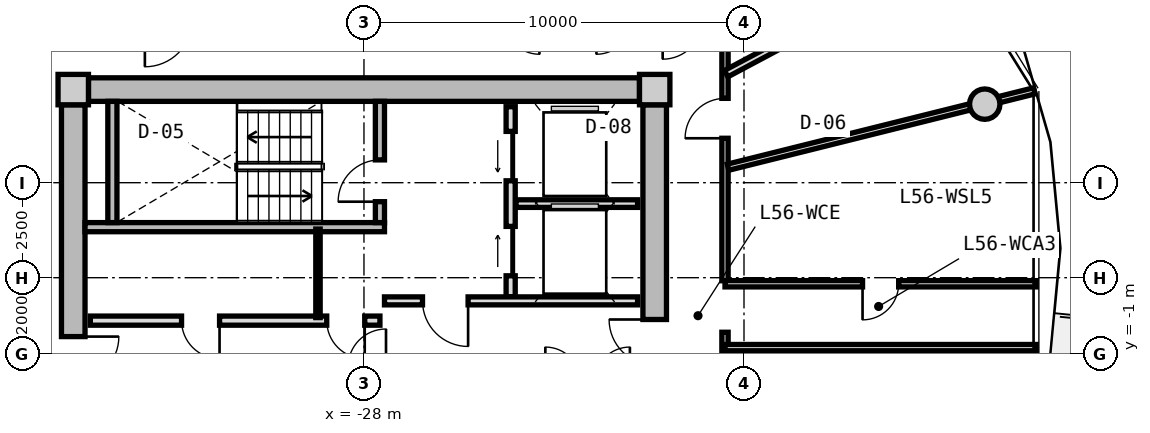
"""IFC4 building model, lengths in metres.
Left out: names, types, materials, properties, quantities, classifications, styles, units other than length and angle.
Written with IfcOpenShell. Run it as: python <this file> out.ifc"""

import sys

from ifc_helpers import new_model, si_unit, direction, frame, frame_2d, origin, origin_2d, place, context, subcontext, project, spatial, rectangle, circle, extrude, source, transform, mapped, element, fill, save


model = new_model("IFC4")
c1 = context("Model", 3, precision=1e-05, world=origin(), true_north=direction((0.0, 1.0)))
c2 = subcontext(c1, "Body", "Model", "MODEL_VIEW")
j1 = project(units=[si_unit("LENGTHUNIT", "METRE"), si_unit("PLANEANGLEUNIT", "RADIAN")], contexts=[c1])
p1 = place(None, origin())
s1 = spatial("IfcSite", under=j1, at=p1, CompositionType="ELEMENT")
p2 = place(p1, origin())
s2 = spatial("IfcBuilding", under=s1, at=p2, CompositionType="ELEMENT")
p3 = place(p2, frame((0.0, 0.0, 180.05)))
s3 = spatial("IfcBuildingStorey", under=s2, at=p3, CompositionType="ELEMENT", Elevation=180.05)
m1 = source(origin(), c2, "Body", "SweptSolid", [
    extrude(rectangle(XDim=0.8, YDim=0.8, at=origin_2d()), origin(), (0.0, 0.0, 1.0), 3.05),
])
for number, where, z_axis, x_axis in (
    (1, (-20.35, 5.95, 0.0), (0.0, 0.0, 1.0), (1.0, 0.0, 0.0)),
    (2, (-35.65, 5.95, 0.0), (0.0, 0.0, 1.0), (1.0, 0.0, 0.0)),
):
    element("IfcColumn", number, at=place(p3, frame(where, z_axis=z_axis, x_axis=x_axis)), inside=s3, PredefinedType="COLUMN", context=c2, shape_type="MappedRepresentation", body=[
        mapped(m1, transform((0.0, 0.0, 0.0), x_axis=(1.0, 0.0, 0.0), y_axis=(0.0, 1.0, 0.0), z_axis=(0.0, 0.0, 1.0), scale=1.0)),
    ])
m2 = source(origin(), c2, "Body", "SweptSolid", [
    extrude(rectangle(XDim=14.5, YDim=0.62, at=frame_2d((7.25, 0.0))), origin(), (0.0, 0.0, 1.0), 2.81),
])
p4 = place(p3, frame((-35.25, 5.95, 0.0), z_axis=(0.0, 0.0, 1.0), x_axis=(1.0, 0.0, 0.0)))
e3 = element("IfcWall", 3, at=p4, inside=s3, PredefinedType="SHEAR", context=c2, shape_type="MappedRepresentation", body=[
    mapped(m2, transform((0.0, 0.0, 0.0), x_axis=(1.0, 0.0, 0.0), y_axis=(0.0, 1.0, 0.0), z_axis=(0.0, 0.0, 1.0), scale=1.0)),
])
m3 = source(origin(), c2, "Body", "SweptSolid", [
    extrude(rectangle(XDim=11.1, YDim=0.62, at=frame_2d((5.55, 0.0))), origin(), (0.0, 0.0, 1.0), 2.81),
])
p5 = place(p3, frame((-35.65, -5.55, 0.0), z_axis=(0.0, 0.0, 1.0), x_axis=(0.0, 1.0, 0.0)))
e4 = element("IfcWall", 4, at=p5, inside=s3, PredefinedType="SHEAR", context=c2, shape_type="MappedRepresentation", body=[
    mapped(m3, transform((0.0, 0.0, 0.0), x_axis=(1.0, 0.0, 0.0), y_axis=(0.0, 1.0, 0.0), z_axis=(0.0, 0.0, 1.0), scale=1.0)),
])
p6 = place(p5, frame((3.8, 0.0, 0.0)))
e5 = element("IfcOpeningElement", 5, at=p6, cuts=e4, PredefinedType="OPENING", context=c2, shape_type="SweptSolid", body=[
    extrude(rectangle(XDim=1.2, YDim=2.15, at=frame_2d((0.6, 1.075))), frame((0.0, 0.32, 0.0), z_axis=(0.0, -1.0, 0.0), x_axis=(1.0, 0.0, 0.0)), (0.0, 0.0, 1.0), 0.64),
])
p7 = place(p3, frame((-20.35, 5.55, 0.0), z_axis=(0.0, 0.0, 1.0), x_axis=(0.0, -1.0, 0.0)))
e6 = element("IfcWall", 6, at=p7, inside=s3, PredefinedType="SHEAR", context=c2, shape_type="MappedRepresentation", body=[
    mapped(m3, transform((0.0, 0.0, 0.0), x_axis=(1.0, 0.0, 0.0), y_axis=(0.0, 1.0, 0.0), z_axis=(0.0, 0.0, 1.0), scale=1.0)),
])
p8 = place(p7, frame((5.65, 0.0, 0.0)))
e7 = element("IfcOpeningElement", 7, at=p8, cuts=e6, PredefinedType="OPENING", context=c2, shape_type="SweptSolid", body=[
    extrude(rectangle(XDim=1.2, YDim=2.15, at=frame_2d((0.6, 1.075))), frame((0.0, 0.32, 0.0), z_axis=(0.0, -1.0, 0.0), x_axis=(1.0, 0.0, 0.0)), (0.0, 0.0, 1.0), 0.64),
])
m4 = source(origin(), c2, "Body", "SweptSolid", [
    extrude(circle(Radius=0.4, at=origin_2d()), origin(), (0.0, 0.0, 1.0), 3.05),
])
p9 = place(p3, frame((-11.665, 5.567, 0.0), z_axis=(0.0, 0.0, 1.0), x_axis=(1.0, 0.0, 0.0)))
e8 = element("IfcColumn", 8, at=p9, inside=s3, PredefinedType="COLUMN", context=c2, shape_type="MappedRepresentation", body=[
    mapped(m4, transform((0.0, 0.0, 0.0), x_axis=(1.0, 0.0, 0.0), y_axis=(0.0, 1.0, 0.0), z_axis=(0.0, 0.0, 1.0), scale=1.0)),
])
m5 = source(origin(), c2, "Body", "SweptSolid", [
    extrude(rectangle(XDim=7.88, YDim=0.24, at=frame_2d((3.94, 0.0))), origin(), (0.0, 0.0, 1.0), 2.81),
])
p10 = place(p3, frame((-35.34, 2.33, 0.0), z_axis=(0.0, 0.0, 1.0), x_axis=(1.0, 0.0, 0.0)))
e9 = element("IfcWall", 9, at=p10, inside=s3, PredefinedType="PARTITIONING", context=c2, shape_type="MappedRepresentation", body=[
    mapped(m5, transform((0.0, 0.0, 0.0), x_axis=(1.0, 0.0, 0.0), y_axis=(0.0, 1.0, 0.0), z_axis=(0.0, 0.0, 1.0), scale=1.0)),
])
m6 = source(origin(), c2, "Body", "SweptSolid", [
    extrude(rectangle(XDim=3.19, YDim=0.24, at=frame_2d((1.595, 0.0))), origin(), (0.0, 0.0, 1.0), 2.81),
])
p11 = place(p3, frame((-34.62, 2.45, 0.0), z_axis=(0.0, 0.0, 1.0), x_axis=(0.0, 1.0, 0.0)))
e10 = element("IfcWall", 10, at=p11, inside=s3, PredefinedType="PARTITIONING", context=c2, shape_type="MappedRepresentation", body=[
    mapped(m6, transform((0.0, 0.0, 0.0), x_axis=(1.0, 0.0, 0.0), y_axis=(0.0, 1.0, 0.0), z_axis=(0.0, 0.0, 1.0), scale=1.0)),
])
p12 = place(p3, frame((-27.58, 2.45, 0.0), z_axis=(0.0, 0.0, 1.0), x_axis=(0.0, 1.0, 0.0)))
e11 = element("IfcWall", 11, at=p12, inside=s3, PredefinedType="PARTITIONING", context=c2, shape_type="MappedRepresentation", body=[
    mapped(m6, transform((0.0, 0.0, 0.0), x_axis=(1.0, 0.0, 0.0), y_axis=(0.0, 1.0, 0.0), z_axis=(0.0, 0.0, 1.0), scale=1.0)),
])
p13 = place(p12, frame((0.55, 0.0, 0.0)))
e12 = element("IfcOpeningElement", 12, at=p13, cuts=e11, PredefinedType="OPENING", context=c2, shape_type="SweptSolid", body=[
    extrude(rectangle(XDim=1.1, YDim=2.15, at=frame_2d((0.55, 1.075))), frame((0.0, 0.13, 0.0), z_axis=(0.0, -1.0, 0.0), x_axis=(1.0, 0.0, 0.0)), (0.0, 0.0, 1.0), 0.26),
])
m7 = source(origin(), c2, "Body", "SweptSolid", [
    extrude(rectangle(XDim=5.0, YDim=0.24, at=frame_2d((2.5, 0.0))), origin(), (0.0, 0.0, 1.0), 2.795),
])
p14 = place(p3, frame((-24.14, 0.5, 0.0), z_axis=(0.0, 0.0, 1.0), x_axis=(0.0, 1.0, 0.0)))
e13 = element("IfcWall", 13, at=p14, inside=s3, PredefinedType="PARTITIONING", context=c2, shape_type="MappedRepresentation", body=[
    mapped(m7, transform((0.0, 0.0, 0.0), x_axis=(1.0, 0.0, 0.0), y_axis=(0.0, 1.0, 0.0), z_axis=(0.0, 0.0, 1.0), scale=1.0)),
])
p15 = place(p14, frame((3.05, 0.0, 0.0)))
e14 = element("IfcOpeningElement", 14, at=p15, cuts=e13, PredefinedType="OPENING", context=c2, shape_type="SweptSolid", body=[
    extrude(rectangle(XDim=1.3, YDim=2.2, at=frame_2d((0.65, 1.1))), frame((0.0, 0.13, 0.0), z_axis=(0.0, -1.0, 0.0), x_axis=(1.0, 0.0, 0.0)), (0.0, 0.0, 1.0), 0.26),
])
p16 = place(p14, frame((0.55, 0.0, 0.0)))
e15 = element("IfcOpeningElement", 15, at=p16, cuts=e13, PredefinedType="OPENING", context=c2, shape_type="SweptSolid", body=[
    extrude(rectangle(XDim=1.3, YDim=2.2, at=frame_2d((0.65, 1.1))), frame((0.0, 0.13, 0.0), z_axis=(0.0, -1.0, 0.0), x_axis=(1.0, 0.0, 0.0)), (0.0, 0.0, 1.0), 0.26),
])
m8 = source(origin(), c2, "Body", "SweptSolid", [
    extrude(rectangle(XDim=3.2, YDim=0.2, at=frame_2d((1.6, 0.0))), origin(), (0.0, 0.0, 1.0), 2.795),
])
p17 = place(p3, frame((-24.0, 2.95, 0.0), z_axis=(0.0, 0.0, 1.0), x_axis=(1.0, 0.0, 0.0)))
e16 = element("IfcWall", 16, at=p17, inside=s3, PredefinedType="PARTITIONING", context=c2, shape_type="MappedRepresentation", body=[
    mapped(m8, transform((0.0, 0.0, 0.0), x_axis=(1.0, 0.0, 0.0), y_axis=(0.0, 1.0, 0.0), z_axis=(0.0, 0.0, 1.0), scale=1.0)),
])
m9 = source(origin(), c2, "Body", "SweptSolid", [
    extrude(rectangle(XDim=6.66, YDim=0.21, at=frame_2d((3.33, 0.0))), origin(), (0.0, 0.0, 1.0), 2.795),
])
p18 = place(p3, frame((-27.46, 0.39, 0.0), z_axis=(0.0, 0.0, 1.0), x_axis=(1.0, 0.0, 0.0)))
e17 = element("IfcWall", 17, at=p18, inside=s3, PredefinedType="PARTITIONING", context=c2, shape_type="MappedRepresentation", body=[
    mapped(m9, transform((0.0, 0.0, 0.0), x_axis=(1.0, 0.0, 0.0), y_axis=(0.0, 1.0, 0.0), z_axis=(0.0, 0.0, 1.0), scale=1.0)),
])
p19 = place(p18, frame((1.0, 0.0, 0.0)))
e18 = element("IfcOpeningElement", 18, at=p19, cuts=e17, PredefinedType="OPENING", context=c2, shape_type="SweptSolid", body=[
    extrude(rectangle(XDim=1.2, YDim=2.15, at=frame_2d((0.6, 1.075))), frame((0.0, 0.115, 0.0), z_axis=(0.0, -1.0, 0.0), x_axis=(1.0, 0.0, 0.0)), (0.0, 0.0, 1.0), 0.23),
])
m10 = source(origin(), c2, "Body", "SweptSolid", [
    extrude(rectangle(XDim=7.62, YDim=0.24, at=frame_2d((3.81, 0.0))), origin(), (0.0, 0.0, 1.0), 2.795),
])
p20 = place(p3, frame((-35.2, -0.13, 0.0), z_axis=(0.0, 0.0, 1.0), x_axis=(1.0, 0.0, 0.0)))
e19 = element("IfcWall", 19, at=p20, inside=s3, PredefinedType="PARTITIONING", context=c2, shape_type="MappedRepresentation", body=[
    mapped(m10, transform((0.0, 0.0, 0.0), x_axis=(1.0, 0.0, 0.0), y_axis=(0.0, 1.0, 0.0), z_axis=(0.0, 0.0, 1.0), scale=1.0)),
])
p21 = place(p20, frame((6.22, 0.0, 0.0)))
e20 = element("IfcOpeningElement", 20, at=p21, cuts=e19, PredefinedType="OPENING", context=c2, shape_type="SweptSolid", body=[
    extrude(rectangle(XDim=1.0, YDim=2.1, at=frame_2d((0.5, 1.05))), frame((0.0, 0.13, 0.0), z_axis=(0.0, -1.0, 0.0), x_axis=(1.0, 0.0, 0.0)), (0.0, 0.0, 1.0), 0.26),
])
p22 = place(p20, frame((2.4, 0.0, 0.0)))
e21 = element("IfcOpeningElement", 21, at=p22, cuts=e19, PredefinedType="OPENING", context=c2, shape_type="SweptSolid", body=[
    extrude(rectangle(XDim=1.0, YDim=2.1, at=frame_2d((0.5, 1.05))), frame((0.0, 0.13, 0.0), z_axis=(0.0, -1.0, 0.0), x_axis=(1.0, 0.0, 0.0)), (0.0, 0.0, 1.0), 0.26),
])
m11 = source(origin(), c2, "Body", "SweptSolid", [
    extrude(rectangle(XDim=2.33, YDim=0.115, at=frame_2d((1.165, 0.0))), origin(), (0.0, 0.0, 1.0), 2.795),
])
p23 = place(p3, frame((-29.21, -0.05, 0.0), z_axis=(0.0, 0.0, 1.0), x_axis=(0.0, 1.0, 0.0)))
e22 = element("IfcWall", 22, at=p23, inside=s3, PredefinedType="PARTITIONING", context=c2, shape_type="MappedRepresentation", body=[
    mapped(m11, transform((0.0, 0.0, 0.0), x_axis=(1.0, 0.0, 0.0), y_axis=(0.0, 1.0, 0.0), z_axis=(0.0, 0.0, 1.0), scale=1.0)),
])
m12 = source(origin(), c2, "Body", "SweptSolid", [
    extrude(rectangle(XDim=6.88, YDim=0.165, at=frame_2d((3.44, 0.0))), origin(), (0.0, 0.0, 1.0), 2.795),
])
p24 = place(p3, frame((-18.5, 7.8, 0.0), z_axis=(0.0, 0.0, 1.0), x_axis=(0.0, -1.0, 0.0)))
e23 = element("IfcWall", 23, at=p24, inside=s3, PredefinedType="PARTITIONING", context=c2, shape_type="MappedRepresentation", body=[
    mapped(m12, transform((0.0, 0.0, 0.0), x_axis=(1.0, 0.0, 0.0), y_axis=(0.0, 1.0, 0.0), z_axis=(0.0, 0.0, 1.0), scale=1.0)),
])
p25 = place(p24, frame((2.081, 0.0, 0.0)))
e24 = element("IfcOpeningElement", 24, at=p25, cuts=e23, PredefinedType="OPENING", context=c2, shape_type="SweptSolid", body=[
    extrude(rectangle(XDim=1.05, YDim=2.15, at=frame_2d((0.525, 1.075))), frame((0.0, 0.093, 0.0), z_axis=(0.0, -1.0, 0.0), x_axis=(1.0, 0.0, 0.0)), (0.0, 0.0, 1.0), 0.185),
])
m13 = source(origin(), c2, "Body", "SweptSolid", [
    extrude(rectangle(XDim=7.365, YDim=0.165, at=frame_2d((3.682, 0.0))), origin(), (0.0, 0.0, 1.0), 2.795),
])
p26 = place(p3, frame((-18.5, -0.436, 0.0), z_axis=(0.0, 0.0, 1.0), x_axis=(0.0, -1.0, 0.0)))
e25 = element("IfcWall", 25, at=p26, inside=s3, PredefinedType="PARTITIONING", context=c2, shape_type="MappedRepresentation", body=[
    mapped(m13, transform((0.0, 0.0, 0.0), x_axis=(1.0, 0.0, 0.0), y_axis=(0.0, 1.0, 0.0), z_axis=(0.0, 0.0, 1.0), scale=1.0)),
])
p27 = place(p26, frame((2.433, 0.0, 0.0)))
e26 = element("IfcOpeningElement", 26, at=p27, cuts=e25, PredefinedType="OPENING", context=c2, shape_type="SweptSolid", body=[
    extrude(rectangle(XDim=1.25, YDim=2.2, at=frame_2d((0.625, 1.1))), frame((0.0, 0.093, 0.0), z_axis=(0.0, -1.0, 0.0), x_axis=(1.0, 0.0, 0.0)), (0.0, 0.0, 1.0), 0.185),
])
m14 = source(origin(), c2, "Body", "SweptSolid", [
    extrude(rectangle(XDim=5.564, YDim=0.165, at=frame_2d((2.782, 0.0))), origin(), (0.0, 0.0, 1.0), 2.345),
])
p28 = place(p3, frame((-15.76, -1.02, 0.0), z_axis=(0.0, 0.0, 1.0), x_axis=(0.970315176167, -0.241843872984, 0.0)))
e27 = element("IfcWall", 27, at=p28, inside=s3, PredefinedType="PARTITIONING", context=c2, shape_type="MappedRepresentation", body=[
    mapped(m14, transform((0.0, 0.0, 0.0), x_axis=(1.0, 0.0, 0.0), y_axis=(0.0, 1.0, 0.0), z_axis=(0.0, 0.0, 1.0), scale=1.0)),
])
m15 = source(origin(), c2, "Body", "SweptSolid", [
    extrude(rectangle(XDim=8.305, YDim=0.165, at=frame_2d((4.153, 0.0))), origin(), (0.0, 0.0, 1.0), 2.345),
])
p29 = place(p3, frame((-18.42, 3.908, 0.0), z_axis=(0.0, 0.0, 1.0), x_axis=(0.970309994378, 0.241864662175, 0.0)))
e28 = element("IfcWall", 28, at=p29, inside=s3, PredefinedType="PARTITIONING", context=c2, shape_type="MappedRepresentation", body=[
    mapped(m15, transform((0.0, 0.0, 0.0), x_axis=(1.0, 0.0, 0.0), y_axis=(0.0, 1.0, 0.0), z_axis=(0.0, 0.0, 1.0), scale=1.0)),
])
m16 = source(origin(), c2, "Body", "SweptSolid", [
    extrude(rectangle(XDim=8.189, YDim=0.165, at=frame_2d((4.094, 0.0))), origin(), (0.0, 0.0, 1.0), 2.795),
])
p30 = place(p3, frame((-18.5, 0.84, 0.0), z_axis=(0.0, 0.0, 1.0), x_axis=(1.0, 0.0, 0.0)))
e29 = element("IfcWall", 29, at=p30, inside=s3, PredefinedType="PARTITIONING", context=c2, shape_type="MappedRepresentation", body=[
    mapped(m16, transform((0.0, 0.0, 0.0), x_axis=(1.0, 0.0, 0.0), y_axis=(0.0, 1.0, 0.0), z_axis=(0.0, 0.0, 1.0), scale=1.0)),
])
p31 = place(p30, frame((3.619, 0.0, 0.0)))
e30 = element("IfcOpeningElement", 30, at=p31, cuts=e29, PredefinedType="OPENING", context=c2, shape_type="SweptSolid", body=[
    extrude(rectangle(XDim=0.95, YDim=2.1, at=frame_2d((0.475, 1.05))), frame((0.0, 0.093, 0.0), z_axis=(0.0, -1.0, 0.0), x_axis=(1.0, 0.0, 0.0)), (0.0, 0.0, 1.0), 0.185),
])
p32 = place(p3, frame((-10.311, -0.84, 0.0), z_axis=(0.0, 0.0, 1.0), x_axis=(-1.0, 0.0, 0.0)))
e31 = element("IfcWall", 31, at=p32, inside=s3, PredefinedType="PARTITIONING", context=c2, shape_type="MappedRepresentation", body=[
    mapped(m16, transform((0.0, 0.0, 0.0), x_axis=(1.0, 0.0, 0.0), y_axis=(0.0, 1.0, 0.0), z_axis=(0.0, 0.0, 1.0), scale=1.0)),
])
m17 = source(origin(), c2, "Body", "SweptSolid", [
    extrude(rectangle(XDim=6.665, YDim=0.19, at=frame_2d((3.333, 0.0))), origin(), (0.0, 0.0, 1.0), 2.795),
])
p33 = place(p3, frame((-18.47, 6.37, 0.0), z_axis=(0.0, 0.0, 1.0), x_axis=(0.88263769619, 0.470053930166, 0.0)))
e32 = element("IfcWall", 32, at=p33, inside=s3, PredefinedType="PARTITIONING", context=c2, shape_type="MappedRepresentation", body=[
    mapped(m17, transform((0.0, 0.0, 0.0), x_axis=(1.0, 0.0, 0.0), y_axis=(0.0, 1.0, 0.0), z_axis=(0.0, 0.0, 1.0), scale=1.0)),
])
m18 = source(origin(), c2, "Body", "SweptSolid", [
    extrude(rectangle(XDim=1.1, YDim=2.15, at=frame_2d((0.55, 1.075))), frame((0.0, 0.025, 0.0), z_axis=(0.0, -1.0, 0.0), x_axis=(1.0, 0.0, 0.0)), (0.0, 0.0, 1.0), 0.05),
])
p34 = place(p13, origin())
e33 = element("IfcDoor", 33, at=p34, inside=s3, OperationType="SINGLE_SWING_LEFT", PredefinedType="DOOR", context=c2, shape_type="MappedRepresentation", body=[
    mapped(m18, transform((0.0, 0.0, 0.0), x_axis=(1.0, 0.0, 0.0), y_axis=(0.0, 1.0, 0.0), z_axis=(0.0, 0.0, 1.0), scale=1.0)),
])
fill(e12, e33)
m19 = source(origin(), c2, "Body", "SweptSolid", [
    extrude(rectangle(XDim=1.3, YDim=2.2, at=frame_2d((0.65, 1.1))), frame((0.0, 0.025, 0.0), z_axis=(0.0, -1.0, 0.0), x_axis=(1.0, 0.0, 0.0)), (0.0, 0.0, 1.0), 0.05),
])
p35 = place(p15, origin())
e34 = element("IfcDoor", 34, at=p35, inside=s3, OperationType="SLIDING_TO_LEFT", PredefinedType="DOOR", context=c2, shape_type="MappedRepresentation", body=[
    mapped(m19, transform((0.0, 0.0, 0.0), x_axis=(1.0, 0.0, 0.0), y_axis=(0.0, 1.0, 0.0), z_axis=(0.0, 0.0, 1.0), scale=1.0)),
])
fill(e14, e34)
p36 = place(p16, origin())
e35 = element("IfcDoor", 35, at=p36, inside=s3, OperationType="SLIDING_TO_RIGHT", PredefinedType="DOOR", context=c2, shape_type="MappedRepresentation", body=[
    mapped(m19, transform((0.0, 0.0, 0.0), x_axis=(1.0, 0.0, 0.0), y_axis=(0.0, 1.0, 0.0), z_axis=(0.0, 0.0, 1.0), scale=1.0)),
])
fill(e15, e35)
m20 = source(origin(), c2, "Body", "SweptSolid", [
    extrude(rectangle(XDim=1.2, YDim=2.15, at=frame_2d((0.6, 1.075))), frame((0.0, 0.025, 0.0), z_axis=(0.0, -1.0, 0.0), x_axis=(1.0, 0.0, 0.0)), (0.0, 0.0, 1.0), 0.05),
])
p37 = place(p19, frame((1.2, 0.0, 0.0), z_axis=(0.0, 0.0, 1.0), x_axis=(-1.0, 0.0, 0.0)))
e36 = element("IfcDoor", 36, at=p37, inside=s3, OperationType="SINGLE_SWING_LEFT", PredefinedType="DOOR", context=c2, shape_type="MappedRepresentation", body=[
    mapped(m20, transform((0.0, 0.0, 0.0), x_axis=(1.0, 0.0, 0.0), y_axis=(0.0, 1.0, 0.0), z_axis=(0.0, 0.0, 1.0), scale=1.0)),
])
fill(e18, e36)
p38 = place(p6, frame((1.2, 0.0, 0.0), z_axis=(0.0, 0.0, 1.0), x_axis=(-1.0, 0.0, 0.0)))
e37 = element("IfcDoor", 37, at=p38, inside=s3, OperationType="SINGLE_SWING_LEFT", PredefinedType="DOOR", context=c2, shape_type="MappedRepresentation", body=[
    mapped(m20, transform((0.0, 0.0, 0.0), x_axis=(1.0, 0.0, 0.0), y_axis=(0.0, 1.0, 0.0), z_axis=(0.0, 0.0, 1.0), scale=1.0)),
])
fill(e5, e37)
p39 = place(p8, frame((1.2, 0.0, 0.0), z_axis=(0.0, 0.0, 1.0), x_axis=(-1.0, 0.0, 0.0)))
e38 = element("IfcDoor", 38, at=p39, inside=s3, OperationType="SINGLE_SWING_RIGHT", PredefinedType="DOOR", context=c2, shape_type="MappedRepresentation", body=[
    mapped(m20, transform((0.0, 0.0, 0.0), x_axis=(1.0, 0.0, 0.0), y_axis=(0.0, 1.0, 0.0), z_axis=(0.0, 0.0, 1.0), scale=1.0)),
])
fill(e7, e38)
m21 = source(origin(), c2, "Body", "SweptSolid", [
    extrude(rectangle(XDim=1.0, YDim=2.1, at=frame_2d((0.5, 1.05))), frame((0.0, 0.025, 0.0), z_axis=(0.0, -1.0, 0.0), x_axis=(1.0, 0.0, 0.0)), (0.0, 0.0, 1.0), 0.05),
])
p40 = place(p21, frame((1.0, 0.0, 0.0), z_axis=(0.0, 0.0, 1.0), x_axis=(-1.0, 0.0, 0.0)))
e39 = element("IfcDoor", 39, at=p40, inside=s3, OperationType="SINGLE_SWING_LEFT", PredefinedType="DOOR", context=c2, shape_type="MappedRepresentation", body=[
    mapped(m21, transform((0.0, 0.0, 0.0), x_axis=(1.0, 0.0, 0.0), y_axis=(0.0, 1.0, 0.0), z_axis=(0.0, 0.0, 1.0), scale=1.0)),
])
fill(e20, e39)
p41 = place(p22, frame((1.0, 0.0, 0.0), z_axis=(0.0, 0.0, 1.0), x_axis=(-1.0, 0.0, 0.0)))
e40 = element("IfcDoor", 40, at=p41, inside=s3, OperationType="SINGLE_SWING_LEFT", PredefinedType="DOOR", context=c2, shape_type="MappedRepresentation", body=[
    mapped(m21, transform((0.0, 0.0, 0.0), x_axis=(1.0, 0.0, 0.0), y_axis=(0.0, 1.0, 0.0), z_axis=(0.0, 0.0, 1.0), scale=1.0)),
])
fill(e21, e40)
m22 = source(origin(), c2, "Body", "SweptSolid", [
    extrude(rectangle(XDim=0.95, YDim=2.1, at=frame_2d((0.475, 1.05))), frame((0.0, 0.025, 0.0), z_axis=(0.0, -1.0, 0.0), x_axis=(1.0, 0.0, 0.0)), (0.0, 0.0, 1.0), 0.05),
])
p42 = place(p31, frame((0.95, 0.0, 0.0), z_axis=(0.0, 0.0, 1.0), x_axis=(-1.0, 0.0, 0.0)))
e41 = element("IfcDoor", 41, at=p42, inside=s3, OperationType="SINGLE_SWING_RIGHT", PredefinedType="DOOR", context=c2, shape_type="MappedRepresentation", body=[
    mapped(m22, transform((0.0, 0.0, 0.0), x_axis=(1.0, 0.0, 0.0), y_axis=(0.0, 1.0, 0.0), z_axis=(0.0, 0.0, 1.0), scale=1.0)),
])
fill(e30, e41)
m23 = source(origin(), c2, "Body", "SweptSolid", [
    extrude(rectangle(XDim=1.05, YDim=2.15, at=frame_2d((0.525, 1.075))), frame((0.0, 0.025, 0.0), z_axis=(0.0, -1.0, 0.0), x_axis=(1.0, 0.0, 0.0)), (0.0, 0.0, 1.0), 0.05),
])
p43 = place(p25, frame((1.05, 0.0, 0.0), z_axis=(0.0, 0.0, 1.0), x_axis=(-1.0, 0.0, 0.0)))
e42 = element("IfcDoor", 42, at=p43, inside=s3, OperationType="SINGLE_SWING_LEFT", PredefinedType="DOOR", context=c2, shape_type="MappedRepresentation", body=[
    mapped(m23, transform((0.0, 0.0, 0.0), x_axis=(1.0, 0.0, 0.0), y_axis=(0.0, 1.0, 0.0), z_axis=(0.0, 0.0, 1.0), scale=1.0)),
])
fill(e24, e42)
save(model, sys.argv[1])
